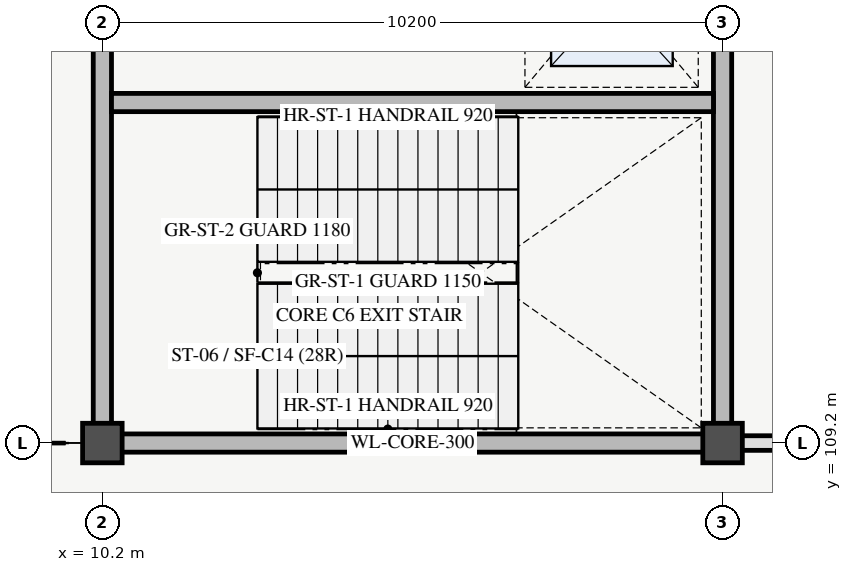
"""IFC4 building model, lengths in metres.
Left out: names, types, materials, properties, quantities, classifications, styles, units other than length and angle.
Written with IfcOpenShell. Run it as: python <this file> out.ifc"""

import sys

from ifc_helpers import new_model, si_unit, direction, frame, frame_2d, origin, origin_2d, place, context, subcontext, project, spatial, rectangle, extrude, element, save


model = new_model("IFC4")
c1 = context("Model", 3, precision=1e-05, world=origin(), true_north=direction((0.0, 1.0)))
c2 = subcontext(c1, "Body", "Model", "MODEL_VIEW")
j1 = project(units=[si_unit("LENGTHUNIT", "METRE"), si_unit("PLANEANGLEUNIT", "RADIAN")], contexts=[c1])
p1 = place(None, origin())
s1 = spatial("IfcSite", under=j1, at=p1, CompositionType="ELEMENT")
p2 = place(p1, origin())
s2 = spatial("IfcBuilding", under=s1, at=p2, CompositionType="ELEMENT")
p3 = place(p2, frame((0.0, 0.0, 15.0)))
s3 = spatial("IfcBuildingStorey", under=s2, at=p3, CompositionType="ELEMENT", Elevation=15.0)
for number, where, z_axis, x_axis in (
    (1, (10.2, 109.2, 0.0), (0.0, 0.0, 1.0), (1.0, 0.0, 0.0)),
    (2, (20.4, 109.2, 0.0), (0.0, 0.0, 1.0), (1.0, 0.0, 0.0)),
):
    element("IfcColumn", number, at=place(p3, frame(where, z_axis=z_axis, x_axis=x_axis)), inside=s3, PredefinedType="COLUMN", context=c2, shape_type="SweptSolid", body=[
        extrude(rectangle(XDim=0.65, YDim=0.65, at=origin_2d()), origin(), (0.0, 0.0, 1.0), 4.2),
    ])
p4 = place(p3, frame((10.2, 109.2, 0.0), z_axis=(0.0, 0.0, 1.0), x_axis=(1.0, 0.0, 0.0)))
e3 = element("IfcWall", 3, at=p4, inside=s3, PredefinedType="SHEAR", context=c2, shape_type="SweptSolid", body=[
    extrude(rectangle(XDim=10.2, YDim=0.3, at=frame_2d((5.1, 0.0))), origin(), (0.0, 0.0, 1.0), 4.2),
])
for number, where, z_axis, x_axis in (
    (4, (10.2, 109.2, 0.0), (0.0, 0.0, 1.0), (0.0, 1.0, 0.0)),
    (5, (20.4, 109.2, 0.0), (0.0, 0.0, 1.0), (0.0, 1.0, 0.0)),
):
    element("IfcWall", number, at=place(p3, frame(where, z_axis=z_axis, x_axis=x_axis)), inside=s3, PredefinedType="SHEAR", context=c2, shape_type="SweptSolid", body=[
        extrude(rectangle(XDim=9.6, YDim=0.3, at=frame_2d((4.8, 0.0))), origin(), (0.0, 0.0, 1.0), 4.2),
    ])
p5 = place(p3, frame((20.64, 109.2, 0.0), z_axis=(0.0, 0.0, 1.0), x_axis=(1.0, 0.0, 0.0)))
e6 = element("IfcWall", 6, at=p5, inside=s3, PredefinedType="STANDARD", context=c2, shape_type="SweptSolid", body=[
    extrude(rectangle(XDim=9.72, YDim=0.24, at=frame_2d((4.86, 0.0))), origin(), (0.0, 0.0, 1.0), 3.06),
])
p6 = place(p5, frame((3.81, 0.0, 0.0)))
e7 = element("IfcOpeningElement", 7, at=p6, cuts=e6, PredefinedType="OPENING", context=c2, shape_type="SweptSolid", body=[
    extrude(rectangle(XDim=2.1, YDim=2.3, at=frame_2d((1.05, 1.15))), frame((0.0, 0.13, 0.0), z_axis=(0.0, -1.0, 0.0), x_axis=(1.0, 0.0, 0.0)), (0.0, 0.0, 1.0), 0.26),
])
p7 = place(p3, frame((10.35, 114.8, 0.0), z_axis=(0.0, 0.0, 1.0), x_axis=(1.0, 0.0, 0.0)))
e8 = element("IfcWall", 8, at=p7, inside=s3, PredefinedType="SHEAR", context=c2, shape_type="SweptSolid", body=[
    extrude(rectangle(XDim=9.9, YDim=0.3, at=frame_2d((4.95, 0.0))), origin(), (0.0, 0.0, 1.0), 4.2),
])
save(model, sys.argv[1])
